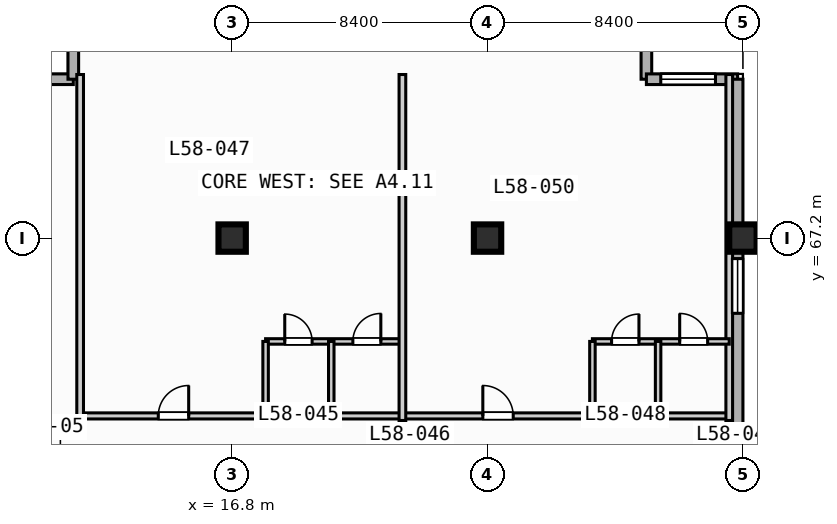
"""IFC4 building model, lengths in metres.
Left out: names, types, materials, properties, quantities, classifications, styles, units other than length and angle.
Written with IfcOpenShell. Run it as: python <this file> out.ifc"""

import sys

from ifc_helpers import new_model, si_unit, direction, frame, frame_2d, origin, origin_2d, place, context, subcontext, project, spatial, rectangle, extrude, element, fill, save


model = new_model("IFC4")
c1 = context("Model", 3, precision=1e-05, world=origin(), true_north=direction((0.0, 1.0)))
c2 = subcontext(c1, "Body", "Model", "MODEL_VIEW")
j1 = project(units=[si_unit("LENGTHUNIT", "METRE"), si_unit("PLANEANGLEUNIT", "RADIAN")], contexts=[c1])
p1 = place(None, origin())
s1 = spatial("IfcSite", under=j1, at=p1, CompositionType="ELEMENT")
p2 = place(p1, origin())
s2 = spatial("IfcBuilding", under=s1, at=p2, CompositionType="ELEMENT")
p3 = place(p2, frame((0.0, 0.0, 237.9)))
s3 = spatial("IfcBuildingStorey", under=s2, at=p3, CompositionType="ELEMENT", Elevation=237.9)
for number, where, z_axis, x_axis in (
    (1, (16.8, 67.2, 0.0), (0.0, 0.0, 1.0), (1.0, 0.0, 0.0)),
    (2, (25.2, 67.2, 0.0), (0.0, 0.0, 1.0), (1.0, 0.0, 0.0)),
    (3, (33.6, 67.2, 0.0), (0.0, 0.0, 1.0), (1.0, 0.0, 0.0)),
):
    element("IfcColumn", number, at=place(p3, frame(where, z_axis=z_axis, x_axis=x_axis)), inside=s3, PredefinedType="COLUMN", context=c2, shape_type="SweptSolid", body=[
        extrude(rectangle(XDim=0.9, YDim=0.9, at=origin_2d()), origin(), (0.0, 0.0, 1.0), 3.7),
    ])
for number, where, z_axis, x_axis in (
    (4, (8.575, 72.425, 0.0), (0.0, 0.0, 1.0), (1.0, 0.0, 0.0)),
    (5, (11.575, 72.425, 0.0), (0.0, 0.0, 1.0), (0.0, 1.0, 0.0)),
    (6, (30.425, 75.425, 0.0), (0.0, 0.0, 1.0), (0.0, -1.0, 0.0)),
):
    element("IfcWall", number, at=place(p3, frame(where, z_axis=z_axis, x_axis=x_axis)), inside=s3, PredefinedType="STANDARD", context=c2, shape_type="SweptSolid", body=[
        extrude(rectangle(XDim=3.0, YDim=0.35, at=frame_2d((1.5, 0.0))), origin(), (0.0, 0.0, 1.0), 3.47),
    ])
p4 = place(p3, frame((30.425, 72.425, 0.0), z_axis=(0.0, 0.0, 1.0), x_axis=(1.0, 0.0, 0.0)))
e7 = element("IfcWall", 7, at=p4, inside=s3, PredefinedType="STANDARD", context=c2, shape_type="SweptSolid", body=[
    extrude(rectangle(XDim=3.0, YDim=0.35, at=frame_2d((1.5, 0.0))), origin(), (0.0, 0.0, 1.0), 3.47),
])
p5 = place(p4, frame((0.472, 0.0, 0.85)))
e8 = element("IfcOpeningElement", 8, at=p5, cuts=e7, PredefinedType="OPENING", context=c2, shape_type="SweptSolid", body=[
    extrude(rectangle(XDim=1.8, YDim=1.8, at=frame_2d((0.9, 0.9))), frame((0.0, 0.185, 0.0), z_axis=(0.0, -1.0, 0.0), x_axis=(1.0, 0.0, 0.0)), (0.0, 0.0, 1.0), 0.37),
])
p6 = place(p3, frame((33.425, 72.425, 0.0), z_axis=(0.0, 0.0, 1.0), x_axis=(0.0, -1.0, 0.0)))
e9 = element("IfcWall", 9, at=p6, inside=s3, PredefinedType="STANDARD", context=c2, shape_type="SweptSolid", body=[
    extrude(rectangle(XDim=39.0, YDim=0.35, at=frame_2d((19.5, 0.0))), origin(), (0.0, 0.0, 1.0), 3.47),
])
p7 = place(p6, frame((5.9, 0.0, 0.85)))
e10 = element("IfcOpeningElement", 10, at=p7, cuts=e9, PredefinedType="OPENING", context=c2, shape_type="SweptSolid", body=[
    extrude(rectangle(XDim=1.8, YDim=1.8, at=frame_2d((0.9, 0.9))), frame((0.0, 0.185, 0.0), z_axis=(0.0, -1.0, 0.0), x_axis=(1.0, 0.0, 0.0)), (0.0, 0.0, 1.0), 0.37),
])
p8 = place(p3, frame((11.8, 61.35, 0.0), z_axis=(0.0, 0.0, 1.0), x_axis=(1.0, 0.0, 0.0)))
e11 = element("IfcWall", 11, at=p8, inside=s3, PredefinedType="PARTITIONING", context=c2, shape_type="SweptSolid", body=[
    extrude(rectangle(XDim=21.35, YDim=0.2, at=frame_2d((10.675, 0.0))), origin(), (0.0, 0.0, 1.0), 3.47),
])
p9 = place(p8, frame((2.57, 0.0, 0.0)))
e12 = element("IfcOpeningElement", 12, at=p9, cuts=e11, PredefinedType="OPENING", context=c2, shape_type="SweptSolid", body=[
    extrude(rectangle(XDim=1.0, YDim=2.15, at=frame_2d((0.5, 1.075))), frame((0.0, 0.11, 0.0), z_axis=(0.0, -1.0, 0.0), x_axis=(1.0, 0.0, 0.0)), (0.0, 0.0, 1.0), 0.22),
])
p10 = place(p8, frame((13.245, 0.0, 0.0)))
e13 = element("IfcOpeningElement", 13, at=p10, cuts=e11, PredefinedType="OPENING", context=c2, shape_type="SweptSolid", body=[
    extrude(rectangle(XDim=1.0, YDim=2.15, at=frame_2d((0.5, 1.075))), frame((0.0, 0.11, 0.0), z_axis=(0.0, -1.0, 0.0), x_axis=(1.0, 0.0, 0.0)), (0.0, 0.0, 1.0), 0.22),
])
p11 = place(p3, frame((11.8, 61.2, 0.0), z_axis=(0.0, 0.0, 1.0), x_axis=(0.0, 1.0, 0.0)))
e14 = element("IfcWall", 14, at=p11, inside=s3, PredefinedType="PARTITIONING", context=c2, shape_type="SweptSolid", body=[
    extrude(rectangle(XDim=11.38, YDim=0.22, at=frame_2d((5.69, 0.0))), origin(), (0.0, 0.0, 1.0), 3.47),
])
p12 = place(p3, frame((17.9, 63.8, 0.0), z_axis=(0.0, 0.0, 1.0), x_axis=(1.0, 0.0, 0.0)))
e15 = element("IfcWall", 15, at=p12, inside=s3, PredefinedType="PLUMBINGWALL", context=c2, shape_type="SweptSolid", body=[
    extrude(rectangle(XDim=4.5, YDim=0.18, at=frame_2d((2.25, 0.0))), origin(), (0.0, 0.0, 1.0), 3.47),
])
p13 = place(p12, frame((0.63, 0.0, 0.0)))
e16 = element("IfcOpeningElement", 16, at=p13, cuts=e15, PredefinedType="OPENING", context=c2, shape_type="SweptSolid", body=[
    extrude(rectangle(XDim=0.9, YDim=2.1, at=frame_2d((0.45, 1.05))), frame((0.0, 0.1, 0.0), z_axis=(0.0, -1.0, 0.0), x_axis=(1.0, 0.0, 0.0)), (0.0, 0.0, 1.0), 0.2),
])
p14 = place(p12, frame((2.87, 0.0, 0.0)))
e17 = element("IfcOpeningElement", 17, at=p14, cuts=e15, PredefinedType="OPENING", context=c2, shape_type="SweptSolid", body=[
    extrude(rectangle(XDim=0.92, YDim=2.1, at=frame_2d((0.46, 1.05))), frame((0.0, 0.1, 0.0), z_axis=(0.0, -1.0, 0.0), x_axis=(1.0, 0.0, 0.0)), (0.0, 0.0, 1.0), 0.2),
])
for number, where, z_axis, x_axis in (
    (18, (17.9, 61.35, 0.0), (0.0, 0.0, 1.0), (0.0, 1.0, 0.0)),
    (19, (20.06, 61.35, 0.0), (0.0, 0.0, 1.0), (0.0, 1.0, 0.0)),
):
    element("IfcWall", number, at=place(p3, frame(where, z_axis=z_axis, x_axis=x_axis)), inside=s3, PredefinedType="PLUMBINGWALL", context=c2, shape_type="SweptSolid", body=[
        extrude(rectangle(XDim=2.45, YDim=0.18, at=frame_2d((1.225, 0.0))), origin(), (0.0, 0.0, 1.0), 3.47),
    ])
for number, where, z_axis, x_axis in (
    (20, (22.4, 61.2, 0.0), (0.0, 0.0, 1.0), (0.0, 1.0, 0.0)),
    (21, (33.15, 61.2, 0.0), (0.0, 0.0, 1.0), (0.0, 1.0, 0.0)),
):
    element("IfcWall", number, at=place(p3, frame(where, z_axis=z_axis, x_axis=x_axis)), inside=s3, PredefinedType="PARTITIONING", context=c2, shape_type="SweptSolid", body=[
        extrude(rectangle(XDim=11.38, YDim=0.22, at=frame_2d((5.69, 0.0))), origin(), (0.0, 0.0, 1.0), 3.47),
    ])
p15 = place(p3, frame((28.65, 63.8, 0.0), z_axis=(0.0, 0.0, 1.0), x_axis=(1.0, 0.0, 0.0)))
e22 = element("IfcWall", 22, at=p15, inside=s3, PredefinedType="PLUMBINGWALL", context=c2, shape_type="SweptSolid", body=[
    extrude(rectangle(XDim=4.5, YDim=0.18, at=frame_2d((2.25, 0.0))), origin(), (0.0, 0.0, 1.0), 3.47),
])
p16 = place(p15, frame((0.63, 0.0, 0.0)))
e23 = element("IfcOpeningElement", 23, at=p16, cuts=e22, PredefinedType="OPENING", context=c2, shape_type="SweptSolid", body=[
    extrude(rectangle(XDim=0.9, YDim=2.1, at=frame_2d((0.45, 1.05))), frame((0.0, 0.1, 0.0), z_axis=(0.0, -1.0, 0.0), x_axis=(1.0, 0.0, 0.0)), (0.0, 0.0, 1.0), 0.2),
])
p17 = place(p15, frame((2.87, 0.0, 0.0)))
e24 = element("IfcOpeningElement", 24, at=p17, cuts=e22, PredefinedType="OPENING", context=c2, shape_type="SweptSolid", body=[
    extrude(rectangle(XDim=0.92, YDim=2.1, at=frame_2d((0.46, 1.05))), frame((0.0, 0.1, 0.0), z_axis=(0.0, -1.0, 0.0), x_axis=(1.0, 0.0, 0.0)), (0.0, 0.0, 1.0), 0.2),
])
for number, where, z_axis, x_axis in (
    (25, (28.65, 61.35, 0.0), (0.0, 0.0, 1.0), (0.0, 1.0, 0.0)),
    (26, (30.81, 61.35, 0.0), (0.0, 0.0, 1.0), (0.0, 1.0, 0.0)),
):
    element("IfcWall", number, at=place(p3, frame(where, z_axis=z_axis, x_axis=x_axis)), inside=s3, PredefinedType="PLUMBINGWALL", context=c2, shape_type="SweptSolid", body=[
        extrude(rectangle(XDim=2.45, YDim=0.18, at=frame_2d((1.225, 0.0))), origin(), (0.0, 0.0, 1.0), 3.47),
    ])
p18 = place(p5, origin())
e27 = element("IfcWindow", 27, at=p18, inside=s3, PartitioningType="SINGLE_PANEL", PredefinedType="WINDOW", context=c2, shape_type="SweptSolid", body=[
    extrude(rectangle(XDim=1.8, YDim=1.8, at=frame_2d((0.9, 0.9))), frame((0.0, 0.03, 0.0), z_axis=(0.0, -1.0, 0.0), x_axis=(1.0, 0.0, 0.0)), (0.0, 0.0, 1.0), 0.06),
])
fill(e8, e27)
p19 = place(p7, origin())
e28 = element("IfcWindow", 28, at=p19, inside=s3, PartitioningType="SINGLE_PANEL", PredefinedType="WINDOW", context=c2, shape_type="SweptSolid", body=[
    extrude(rectangle(XDim=1.8, YDim=1.8, at=frame_2d((0.9, 0.9))), frame((0.0, 0.03, 0.0), z_axis=(0.0, -1.0, 0.0), x_axis=(1.0, 0.0, 0.0)), (0.0, 0.0, 1.0), 0.06),
])
fill(e10, e28)
p20 = place(p9, origin())
e29 = element("IfcDoor", 29, at=p20, inside=s3, OperationType="SINGLE_SWING_RIGHT", PredefinedType="DOOR", context=c2, shape_type="SweptSolid", body=[
    extrude(rectangle(XDim=1.0, YDim=2.15, at=frame_2d((0.5, 1.075))), frame((0.0, 0.025, 0.0), z_axis=(0.0, -1.0, 0.0), x_axis=(1.0, 0.0, 0.0)), (0.0, 0.0, 1.0), 0.05),
])
fill(e12, e29)
p21 = place(p10, origin())
e30 = element("IfcDoor", 30, at=p21, inside=s3, OperationType="SINGLE_SWING_LEFT", PredefinedType="DOOR", context=c2, shape_type="SweptSolid", body=[
    extrude(rectangle(XDim=1.0, YDim=2.15, at=frame_2d((0.5, 1.075))), frame((0.0, 0.025, 0.0), z_axis=(0.0, -1.0, 0.0), x_axis=(1.0, 0.0, 0.0)), (0.0, 0.0, 1.0), 0.05),
])
fill(e13, e30)
p22 = place(p13, origin())
e31 = element("IfcDoor", 31, at=p22, inside=s3, OperationType="SINGLE_SWING_LEFT", PredefinedType="DOOR", context=c2, shape_type="SweptSolid", body=[
    extrude(rectangle(XDim=0.9, YDim=2.1, at=frame_2d((0.45, 1.05))), frame((0.0, 0.025, 0.0), z_axis=(0.0, -1.0, 0.0), x_axis=(1.0, 0.0, 0.0)), (0.0, 0.0, 1.0), 0.05),
])
fill(e16, e31)
p23 = place(p14, origin())
e32 = element("IfcDoor", 32, at=p23, inside=s3, OperationType="SINGLE_SWING_RIGHT", PredefinedType="DOOR", context=c2, shape_type="SweptSolid", body=[
    extrude(rectangle(XDim=0.92, YDim=2.1, at=frame_2d((0.46, 1.05))), frame((0.0, 0.025, 0.0), z_axis=(0.0, -1.0, 0.0), x_axis=(1.0, 0.0, 0.0)), (0.0, 0.0, 1.0), 0.05),
])
fill(e17, e32)
p24 = place(p16, origin())
e33 = element("IfcDoor", 33, at=p24, inside=s3, OperationType="SINGLE_SWING_RIGHT", PredefinedType="DOOR", context=c2, shape_type="SweptSolid", body=[
    extrude(rectangle(XDim=0.9, YDim=2.1, at=frame_2d((0.45, 1.05))), frame((0.0, 0.025, 0.0), z_axis=(0.0, -1.0, 0.0), x_axis=(1.0, 0.0, 0.0)), (0.0, 0.0, 1.0), 0.05),
])
fill(e23, e33)
p25 = place(p17, origin())
e34 = element("IfcDoor", 34, at=p25, inside=s3, OperationType="SINGLE_SWING_LEFT", PredefinedType="DOOR", context=c2, shape_type="SweptSolid", body=[
    extrude(rectangle(XDim=0.92, YDim=2.1, at=frame_2d((0.46, 1.05))), frame((0.0, 0.025, 0.0), z_axis=(0.0, -1.0, 0.0), x_axis=(1.0, 0.0, 0.0)), (0.0, 0.0, 1.0), 0.05),
])
fill(e24, e34)
save(model, sys.argv[1])
